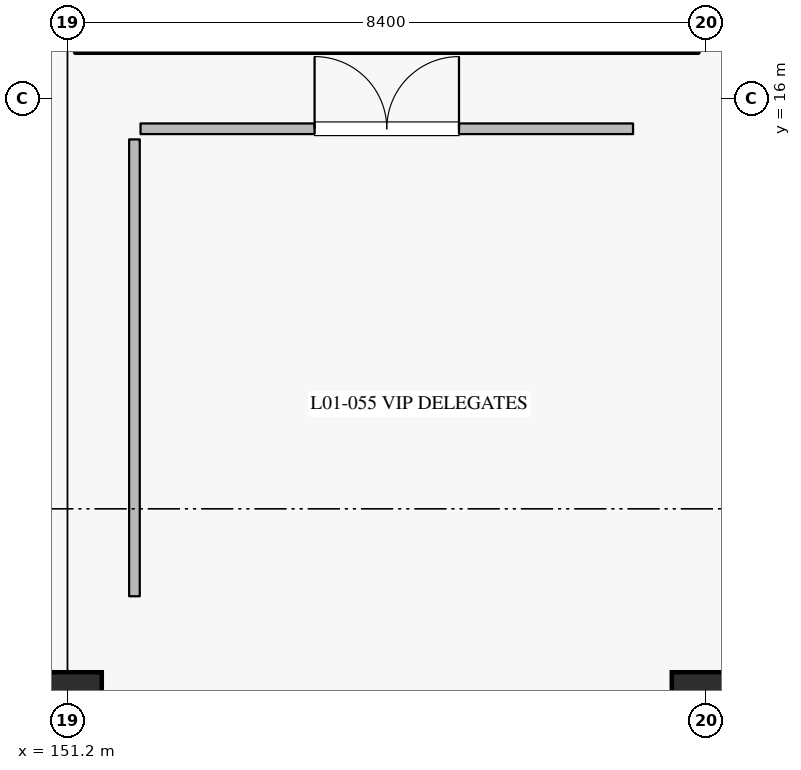
"""IFC4 building model, lengths in metres.
Left out: names, types, materials, properties, quantities, classifications, styles, units other than length and angle.
Written with IfcOpenShell. Run it as: python <this file> out.ifc"""

import sys

from ifc_helpers import new_model, si_unit, direction, frame, frame_2d, origin, origin_2d, place, context, subcontext, project, spatial, rectangle, circle, extrude, element, fill, save


model = new_model("IFC4")
c1 = context("Model", 3, precision=1e-05, world=origin(), true_north=direction((0.0, 1.0)))
c2 = subcontext(c1, "Body", "Model", "MODEL_VIEW")
j1 = project(units=[si_unit("LENGTHUNIT", "METRE"), si_unit("PLANEANGLEUNIT", "RADIAN")], contexts=[c1])
p1 = place(None, origin())
s1 = spatial("IfcSite", under=j1, at=p1, CompositionType="ELEMENT")
p2 = place(p1, origin())
s2 = spatial("IfcBuilding", under=s1, at=p2, CompositionType="ELEMENT")
p3 = place(p2, frame((0.0, 0.0, 6.0)))
s3 = spatial("IfcBuildingStorey", under=s2, at=p3, CompositionType="ELEMENT", Elevation=6.0)
for number, where, z_axis, x_axis in (
    (1, (151.2, 8.0, 0.0), (0.0, 0.0, 1.0), (1.0, 0.0, 0.0)),
    (2, (159.6, 8.0, 0.0), (0.0, 0.0, 1.0), (1.0, 0.0, 0.0)),
):
    element("IfcColumn", number, at=place(p3, frame(where, z_axis=z_axis, x_axis=x_axis)), inside=s3, PredefinedType="COLUMN", context=c2, shape_type="SweptSolid", body=[
        extrude(circle(Radius=0.45, at=origin_2d()), origin(), (0.0, 0.0, 1.0), 5.4),
    ])
p4 = place(p3, frame((152.16, 15.6, 0.0), z_axis=(0.0, 0.0, 1.0), x_axis=(1.0, 0.0, 0.0)))
e3 = element("IfcWall", 3, at=p4, inside=s3, PredefinedType="PARTITIONING", context=c2, shape_type="SweptSolid", body=[
    extrude(rectangle(XDim=6.48, YDim=0.14, at=frame_2d((3.24, 0.0))), origin(), (0.0, 0.0, 1.0), 5.045),
])
p5 = place(p4, frame((2.29, 0.0, 0.0)))
e4 = element("IfcOpeningElement", 4, at=p5, cuts=e3, PredefinedType="OPENING", context=c2, shape_type="SweptSolid", body=[
    extrude(rectangle(XDim=1.9, YDim=2.4, at=frame_2d((0.95, 1.2))), frame((0.0, 0.08, 0.0), z_axis=(0.0, -1.0, 0.0), x_axis=(1.0, 0.0, 0.0)), (0.0, 0.0, 1.0), 0.16),
])
p6 = place(p3, frame((152.08, 9.45, 0.0), z_axis=(0.0, 0.0, 1.0), x_axis=(0.0, 1.0, 0.0)))
e5 = element("IfcWall", 5, at=p6, inside=s3, PredefinedType="PARTITIONING", context=c2, shape_type="SweptSolid", body=[
    extrude(rectangle(XDim=6.01, YDim=0.14, at=frame_2d((3.005, 0.0))), origin(), (0.0, 0.0, 1.0), 5.045),
])
p7 = place(p5, origin())
e6 = element("IfcDoor", 6, at=p7, inside=s3, OperationType="DOUBLE_DOOR_SINGLE_SWING", PredefinedType="DOOR", context=c2, shape_type="SweptSolid", body=[
    extrude(rectangle(XDim=1.9, YDim=2.4, at=frame_2d((0.95, 1.2))), frame((0.0, 0.025, 0.0), z_axis=(0.0, -1.0, 0.0), x_axis=(1.0, 0.0, 0.0)), (0.0, 0.0, 1.0), 0.05),
])
fill(e4, e6)
save(model, sys.argv[1])
